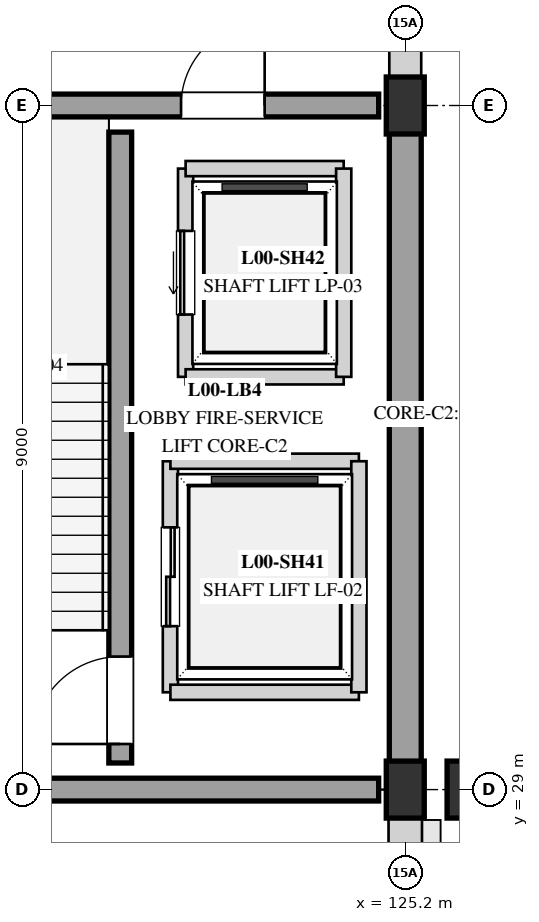
"""IFC4 building model, lengths in metres.
Left out: names, types, materials, properties, quantities, classifications, styles, units other than length and angle.
Written with IfcOpenShell. Run it as: python <this file> out.ifc"""

import sys

from ifc_helpers import new_model, si_unit, direction, frame, frame_2d, origin, origin_2d, place, context, subcontext, project, spatial, rectangle, extrude, element, fill, save


model = new_model("IFC4")
c1 = context("Model", 3, precision=1e-05, world=origin(), true_north=direction((0.0, 1.0)))
c2 = subcontext(c1, "Body", "Model", "MODEL_VIEW")
j1 = project(units=[si_unit("LENGTHUNIT", "METRE"), si_unit("PLANEANGLEUNIT", "RADIAN")], contexts=[c1])
p1 = place(None, origin())
s1 = spatial("IfcSite", under=j1, at=p1, CompositionType="ELEMENT")
p2 = place(p1, origin())
s2 = spatial("IfcBuilding", under=s1, at=p2, CompositionType="ELEMENT")
p3 = place(p2, origin())
s3 = spatial("IfcBuildingStorey", under=s2, at=p3, CompositionType="ELEMENT", Elevation=0.0)
for number, where, z_axis, x_axis in (
    (1, (125.2, 29.0, 0.0), (0.0, 0.0, 1.0), (1.0, 0.0, 0.0)),
    (2, (125.2, 38.0, 0.0), (0.0, 0.0, 1.0), (1.0, 0.0, 0.0)),
    (3, (126.0, 29.0, 0.0), (0.0, 0.0, 1.0), (1.0, 0.0, 0.0)),
):
    element("IfcColumn", number, at=place(p3, frame(where, z_axis=z_axis, x_axis=x_axis)), inside=s3, PredefinedType="COLUMN", context=c2, shape_type="SweptSolid", body=[
        extrude(rectangle(XDim=0.5, YDim=0.75, at=origin_2d()), origin(), (0.0, 0.0, 1.0), 4.5),
    ])
p4 = place(p3, frame((125.2, 20.0, 0.0), z_axis=(0.0, 0.0, 1.0), x_axis=(0.0, 1.0, 0.0)))
e4 = element("IfcWall", 4, at=p4, inside=s3, PredefinedType="STANDARD", context=c2, shape_type="SweptSolid", body=[
    extrude(rectangle(XDim=9.0, YDim=0.44, at=frame_2d((4.5, 0.0))), origin(), (0.0, 0.0, 1.0), 3.19),
])
p5 = place(p4, frame((2.9, 0.0, 1.5)))
e5 = element("IfcOpeningElement", 5, at=p5, cuts=e4, PredefinedType="OPENING", context=c2, shape_type="SweptSolid", body=[
    extrude(rectangle(XDim=3.2, YDim=1.5, at=frame_2d((1.6, 0.75))), frame((0.0, 0.23, 0.0), z_axis=(0.0, -1.0, 0.0), x_axis=(1.0, 0.0, 0.0)), (0.0, 0.0, 1.0), 0.46),
])
p6 = place(p3, frame((125.2, 29.0, 0.0), z_axis=(0.0, 0.0, 1.0), x_axis=(0.0, 1.0, 0.0)))
e6 = element("IfcWall", 6, at=p6, inside=s3, PredefinedType="STANDARD", context=c2, shape_type="SweptSolid", body=[
    extrude(rectangle(XDim=9.0, YDim=0.42, at=frame_2d((4.5, 0.0))), origin(), (0.0, 0.0, 1.0), 4.24),
])
p7 = place(p3, frame((125.2, 38.0, 0.0), z_axis=(0.0, 0.0, 1.0), x_axis=(0.0, 1.0, 0.0)))
e7 = element("IfcWall", 7, at=p7, inside=s3, PredefinedType="STANDARD", context=c2, shape_type="SweptSolid", body=[
    extrude(rectangle(XDim=9.0, YDim=0.42, at=frame_2d((4.5, 0.0))), origin(), (0.0, 0.0, 1.0), 3.37),
])
p8 = place(p7, frame((3.45, 0.0, 0.0)))
e8 = element("IfcOpeningElement", 8, at=p8, cuts=e7, PredefinedType="OPENING", context=c2, shape_type="SweptSolid", body=[
    extrude(rectangle(XDim=2.1, YDim=2.5, at=frame_2d((1.05, 1.25))), frame((0.0, 0.22, 0.0), z_axis=(0.0, -1.0, 0.0), x_axis=(1.0, 0.0, 0.0)), (0.0, 0.0, 1.0), 0.44),
])
p9 = place(p3, frame((121.45, 29.35, 0.0), z_axis=(0.0, 0.0, 1.0), x_axis=(0.0, 1.0, 0.0)))
e9 = element("IfcWall", 9, at=p9, inside=s3, PredefinedType="SHEAR", context=c2, shape_type="SweptSolid", body=[
    extrude(rectangle(XDim=8.3, YDim=0.3, at=frame_2d((4.15, 0.0))), origin(), (0.0, 0.0, 1.0), 4.22),
])
p10 = place(p9, frame((0.25, 0.0, 0.0)))
e10 = element("IfcOpeningElement", 10, at=p10, cuts=e9, PredefinedType="OPENING", context=c2, shape_type="SweptSolid", body=[
    extrude(rectangle(XDim=1.15, YDim=2.15, at=frame_2d((0.575, 1.075))), frame((0.0, 0.16, 0.0), z_axis=(0.0, -1.0, 0.0), x_axis=(1.0, 0.0, 0.0)), (0.0, 0.0, 1.0), 0.32),
])
p11 = place(p3, frame((117.35, 29.0, 0.0), z_axis=(0.0, 0.0, 1.0), x_axis=(1.0, 0.0, 0.0)))
e11 = element("IfcWall", 11, at=p11, inside=s3, PredefinedType="SHEAR", context=c2, shape_type="SweptSolid", body=[
    extrude(rectangle(XDim=7.5, YDim=0.3, at=frame_2d((3.75, 0.0))), origin(), (0.0, 0.0, 1.0), 4.22),
])
p12 = place(p3, frame((117.35, 38.0, 0.0), z_axis=(0.0, 0.0, 1.0), x_axis=(1.0, 0.0, 0.0)))
e12 = element("IfcWall", 12, at=p12, inside=s3, PredefinedType="SHEAR", context=c2, shape_type="SweptSolid", body=[
    extrude(rectangle(XDim=7.5, YDim=0.3, at=frame_2d((3.75, 0.0))), origin(), (0.0, 0.0, 1.0), 4.22),
])
p13 = place(p12, frame((4.9, 0.0, 0.0)))
e13 = element("IfcOpeningElement", 13, at=p13, cuts=e12, PredefinedType="OPENING", context=c2, shape_type="SweptSolid", body=[
    extrude(rectangle(XDim=1.1, YDim=2.1, at=frame_2d((0.55, 1.05))), frame((0.0, 0.16, 0.0), z_axis=(0.0, -1.0, 0.0), x_axis=(1.0, 0.0, 0.0)), (0.0, 0.0, 1.0), 0.32),
])
p14 = place(p3, frame((122.11, 30.28, 0.0), z_axis=(0.0, 0.0, 1.0), x_axis=(0.0, 1.0, 0.0)))
e14 = element("IfcWall", 14, at=p14, inside=s3, PredefinedType="SOLIDWALL", context=c2, shape_type="SweptSolid", body=[
    extrude(rectangle(XDim=3.04, YDim=0.2, at=frame_2d((1.52, 0.0))), origin(), (0.0, 0.0, 1.0), 3.2),
])
p15 = place(p14, frame((0.87, 0.0, 0.0)))
e15 = element("IfcOpeningElement", 15, at=p15, cuts=e14, PredefinedType="OPENING", context=c2, shape_type="SweptSolid", body=[
    extrude(rectangle(XDim=1.3, YDim=2.2, at=frame_2d((0.65, 1.1))), frame((0.0, 0.11, 0.0), z_axis=(0.0, -1.0, 0.0), x_axis=(1.0, 0.0, 0.0)), (0.0, 0.0, 1.0), 0.22),
])
for number, where, z_axis, x_axis in (
    (16, (122.11, 30.28, 0.0), (0.0, 0.0, 1.0), (1.0, 0.0, 0.0)),
    (17, (122.11, 33.32, 0.0), (0.0, 0.0, 1.0), (1.0, 0.0, 0.0)),
):
    element("IfcWall", number, at=place(p3, frame(where, z_axis=z_axis, x_axis=x_axis)), inside=s3, PredefinedType="SOLIDWALL", context=c2, shape_type="SweptSolid", body=[
        extrude(rectangle(XDim=2.48, YDim=0.2, at=frame_2d((1.24, 0.0))), origin(), (0.0, 0.0, 1.0), 3.2),
    ])
p16 = place(p3, frame((124.59, 30.28, 0.0), z_axis=(0.0, 0.0, 1.0), x_axis=(0.0, 1.0, 0.0)))
e18 = element("IfcWall", 18, at=p16, inside=s3, PredefinedType="SOLIDWALL", context=c2, shape_type="SweptSolid", body=[
    extrude(rectangle(XDim=3.04, YDim=0.2, at=frame_2d((1.52, 0.0))), origin(), (0.0, 0.0, 1.0), 3.2),
])
p17 = place(p3, frame((122.31, 34.43, 0.0), z_axis=(0.0, 0.0, 1.0), x_axis=(0.0, 1.0, 0.0)))
e19 = element("IfcWall", 19, at=p17, inside=s3, PredefinedType="SOLIDWALL", context=c2, shape_type="SweptSolid", body=[
    extrude(rectangle(XDim=2.74, YDim=0.2, at=frame_2d((1.37, 0.0))), origin(), (0.0, 0.0, 1.0), 3.2),
])
p18 = place(p17, frame((0.82, 0.0, 0.0)))
e20 = element("IfcOpeningElement", 20, at=p18, cuts=e19, PredefinedType="OPENING", context=c2, shape_type="SweptSolid", body=[
    extrude(rectangle(XDim=1.1, YDim=2.1, at=frame_2d((0.55, 1.05))), frame((0.0, 0.11, 0.0), z_axis=(0.0, -1.0, 0.0), x_axis=(1.0, 0.0, 0.0)), (0.0, 0.0, 1.0), 0.22),
])
for number, where, z_axis, x_axis in (
    (21, (122.31, 34.43, 0.0), (0.0, 0.0, 1.0), (1.0, 0.0, 0.0)),
    (22, (122.31, 37.17, 0.0), (0.0, 0.0, 1.0), (1.0, 0.0, 0.0)),
):
    element("IfcWall", number, at=place(p3, frame(where, z_axis=z_axis, x_axis=x_axis)), inside=s3, PredefinedType="SOLIDWALL", context=c2, shape_type="SweptSolid", body=[
        extrude(rectangle(XDim=2.08, YDim=0.2, at=frame_2d((1.04, 0.0))), origin(), (0.0, 0.0, 1.0), 3.2),
    ])
p19 = place(p3, frame((124.39, 34.43, 0.0), z_axis=(0.0, 0.0, 1.0), x_axis=(0.0, 1.0, 0.0)))
e23 = element("IfcWall", 23, at=p19, inside=s3, PredefinedType="SOLIDWALL", context=c2, shape_type="SweptSolid", body=[
    extrude(rectangle(XDim=2.74, YDim=0.2, at=frame_2d((1.37, 0.0))), origin(), (0.0, 0.0, 1.0), 3.2),
])
p20 = place(p10, origin())
e24 = element("IfcDoor", 24, at=p20, inside=s3, OperationType="SINGLE_SWING_LEFT", PredefinedType="DOOR", context=c2, shape_type="SweptSolid", body=[
    extrude(rectangle(XDim=1.15, YDim=2.15, at=frame_2d((0.575, 1.075))), frame((0.0, 0.025, 0.0), z_axis=(0.0, -1.0, 0.0), x_axis=(1.0, 0.0, 0.0)), (0.0, 0.0, 1.0), 0.05),
])
fill(e10, e24)
p21 = place(p13, origin())
e25 = element("IfcDoor", 25, at=p21, inside=s3, OperationType="SINGLE_SWING_RIGHT", PredefinedType="DOOR", context=c2, shape_type="SweptSolid", body=[
    extrude(rectangle(XDim=1.1, YDim=2.1, at=frame_2d((0.55, 1.05))), frame((0.0, 0.025, 0.0), z_axis=(0.0, -1.0, 0.0), x_axis=(1.0, 0.0, 0.0)), (0.0, 0.0, 1.0), 0.05),
])
fill(e13, e25)
p22 = place(p15, origin())
e26 = element("IfcDoor", 26, at=p22, inside=s3, OperationType="DOUBLE_DOOR_SLIDING", PredefinedType="DOOR", context=c2, shape_type="SweptSolid", body=[
    extrude(rectangle(XDim=1.3, YDim=2.2, at=frame_2d((0.65, 1.1))), frame((0.0, 0.025, 0.0), z_axis=(0.0, -1.0, 0.0), x_axis=(1.0, 0.0, 0.0)), (0.0, 0.0, 1.0), 0.05),
])
fill(e15, e26)
p23 = place(p18, origin())
e27 = element("IfcDoor", 27, at=p23, inside=s3, OperationType="SLIDING_TO_LEFT", PredefinedType="DOOR", context=c2, shape_type="SweptSolid", body=[
    extrude(rectangle(XDim=1.1, YDim=2.1, at=frame_2d((0.55, 1.05))), frame((0.0, 0.025, 0.0), z_axis=(0.0, -1.0, 0.0), x_axis=(1.0, 0.0, 0.0)), (0.0, 0.0, 1.0), 0.05),
])
fill(e20, e27)
save(model, sys.argv[1])
